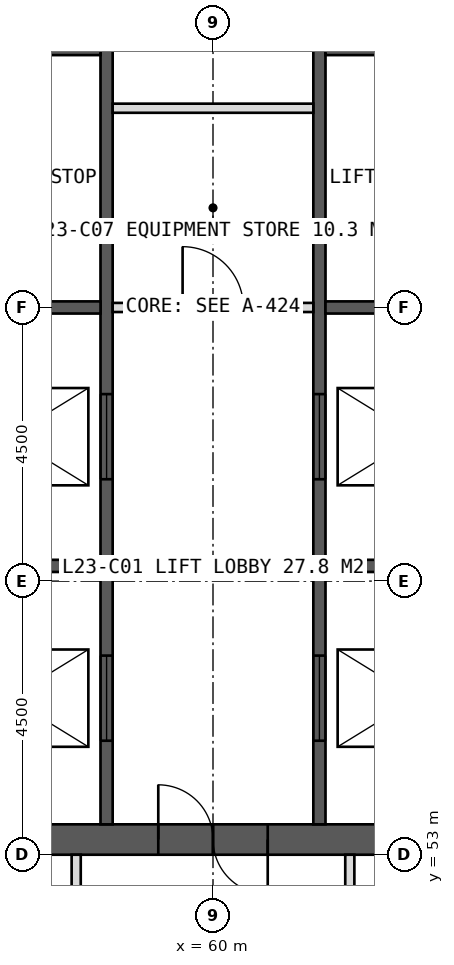
"""IFC4 building model, lengths in metres.
Left out: names, types, materials, properties, quantities, classifications, styles, units other than length and angle.
Written with IfcOpenShell. Run it as: python <this file> out.ifc"""

import sys

from ifc_helpers import new_model, si_unit, direction, frame, frame_2d, origin, place, context, subcontext, project, spatial, rectangle, extrude, element, fill, save


model = new_model("IFC4")
c1 = context("Model", 3, precision=1e-05, world=origin(), true_north=direction((0.0, 1.0)))
c2 = subcontext(c1, "Body", "Model", "MODEL_VIEW")
j1 = project(units=[si_unit("LENGTHUNIT", "METRE"), si_unit("PLANEANGLEUNIT", "RADIAN")], contexts=[c1])
p1 = place(None, origin())
s1 = spatial("IfcSite", under=j1, at=p1, CompositionType="ELEMENT")
p2 = place(p1, origin())
s2 = spatial("IfcBuilding", under=s1, at=p2, CompositionType="ELEMENT")
p3 = place(p2, frame((0.0, 0.0, 100.0)))
s3 = spatial("IfcBuildingStorey", under=s2, at=p3, CompositionType="ELEMENT", Elevation=100.0)
p4 = place(p3, frame((51.0, 53.25, 0.0), z_axis=(0.0, 0.0, 1.0), x_axis=(1.0, 0.0, 0.0)))
e1 = element("IfcWall", 1, at=p4, inside=s3, PredefinedType="SHEAR", context=c2, shape_type="SweptSolid", body=[
    extrude(rectangle(XDim=18.0, YDim=0.5, at=frame_2d((9.0, 0.0))), origin(), (0.0, 0.0, 1.0), 4.0),
])
p5 = place(p4, frame((8.1, 0.0, 0.0)))
e2 = element("IfcOpeningElement", 2, at=p5, cuts=e1, PredefinedType="OPENING", context=c2, shape_type="SweptSolid", body=[
    extrude(rectangle(XDim=1.8, YDim=2.2, at=frame_2d((0.9, 1.1))), frame((0.0, 0.26, 0.0), z_axis=(0.0, -1.0, 0.0), x_axis=(1.0, 0.0, 0.0)), (0.0, 0.0, 1.0), 0.52),
])
p6 = place(p3, frame((58.25, 53.5, 0.0), z_axis=(0.0, 0.0, 1.0), x_axis=(0.0, 1.0, 0.0)))
e3 = element("IfcWall", 3, at=p6, inside=s3, PredefinedType="SHEAR", context=c2, shape_type="SweptSolid", body=[
    extrude(rectangle(XDim=17.0, YDim=0.2, at=frame_2d((8.5, 0.0))), origin(), (0.0, 0.0, 1.0), 4.0),
])
p7 = place(p6, frame((1.375, 0.0, 0.0)))
e4 = element("IfcOpeningElement", 4, at=p7, cuts=e3, PredefinedType="OPENING", context=c2, shape_type="SweptSolid", body=[
    extrude(rectangle(XDim=1.4, YDim=2.2, at=frame_2d((0.7, 1.1))), frame((0.0, 0.11, 0.0), z_axis=(0.0, -1.0, 0.0), x_axis=(1.0, 0.0, 0.0)), (0.0, 0.0, 1.0), 0.22),
])
p8 = place(p6, frame((5.675, 0.0, 0.0)))
e5 = element("IfcOpeningElement", 5, at=p8, cuts=e3, PredefinedType="OPENING", context=c2, shape_type="SweptSolid", body=[
    extrude(rectangle(XDim=1.4, YDim=2.2, at=frame_2d((0.7, 1.1))), frame((0.0, 0.11, 0.0), z_axis=(0.0, -1.0, 0.0), x_axis=(1.0, 0.0, 0.0)), (0.0, 0.0, 1.0), 0.22),
])
p9 = place(p3, frame((61.75, 53.5, 0.0), z_axis=(0.0, 0.0, 1.0), x_axis=(0.0, 1.0, 0.0)))
e6 = element("IfcWall", 6, at=p9, inside=s3, PredefinedType="SHEAR", context=c2, shape_type="SweptSolid", body=[
    extrude(rectangle(XDim=17.0, YDim=0.2, at=frame_2d((8.5, 0.0))), origin(), (0.0, 0.0, 1.0), 4.0),
])
p10 = place(p9, frame((1.375, 0.0, 0.0)))
e7 = element("IfcOpeningElement", 7, at=p10, cuts=e6, PredefinedType="OPENING", context=c2, shape_type="SweptSolid", body=[
    extrude(rectangle(XDim=1.4, YDim=2.2, at=frame_2d((0.7, 1.1))), frame((0.0, 0.11, 0.0), z_axis=(0.0, -1.0, 0.0), x_axis=(1.0, 0.0, 0.0)), (0.0, 0.0, 1.0), 0.22),
])
p11 = place(p9, frame((5.675, 0.0, 0.0)))
e8 = element("IfcOpeningElement", 8, at=p11, cuts=e6, PredefinedType="OPENING", context=c2, shape_type="SweptSolid", body=[
    extrude(rectangle(XDim=1.4, YDim=2.2, at=frame_2d((0.7, 1.1))), frame((0.0, 0.11, 0.0), z_axis=(0.0, -1.0, 0.0), x_axis=(1.0, 0.0, 0.0)), (0.0, 0.0, 1.0), 0.22),
])
for number, where, z_axis, x_axis in (
    (9, (55.1, 57.75, 0.0), (0.0, 0.0, 1.0), (1.0, 0.0, 0.0)),
    (10, (61.85, 57.75, 0.0), (0.0, 0.0, 1.0), (1.0, 0.0, 0.0)),
    (11, (55.1, 62.0, 0.0), (0.0, 0.0, 1.0), (1.0, 0.0, 0.0)),
    (12, (61.85, 62.0, 0.0), (0.0, 0.0, 1.0), (1.0, 0.0, 0.0)),
    (13, (55.1, 66.25, 0.0), (0.0, 0.0, 1.0), (1.0, 0.0, 0.0)),
    (14, (61.85, 66.25, 0.0), (0.0, 0.0, 1.0), (1.0, 0.0, 0.0)),
):
    element("IfcWall", number, at=place(p3, frame(where, z_axis=z_axis, x_axis=x_axis)), inside=s3, PredefinedType="SHEAR", context=c2, shape_type="SweptSolid", body=[
        extrude(rectangle(XDim=3.05, YDim=0.2, at=frame_2d((1.525, 0.0))), origin(), (0.0, 0.0, 1.0), 4.0),
    ])
p12 = place(p3, frame((62.25, 53.0, 0.0), z_axis=(0.0, 0.0, 1.0), x_axis=(0.0, -1.0, 0.0)))
e15 = element("IfcWall", 15, at=p12, inside=s3, PredefinedType="PARTITIONING", context=c2, shape_type="SweptSolid", body=[
    extrude(rectangle(XDim=6.6, YDim=0.15, at=frame_2d((3.3, 0.0))), origin(), (0.0, 0.0, 1.0), 3.75),
])
p13 = place(p12, frame((0.6, 0.0, 0.0)))
e16 = element("IfcOpeningElement", 16, at=p13, cuts=e15, PredefinedType="OPENING", context=c2, shape_type="SweptSolid", body=[
    extrude(rectangle(XDim=0.9, YDim=2.1, at=frame_2d((0.45, 1.05))), frame((0.0, 0.085, 0.0), z_axis=(0.0, -1.0, 0.0), x_axis=(1.0, 0.0, 0.0)), (0.0, 0.0, 1.0), 0.17),
])
p14 = place(p3, frame((57.75, 53.0, 0.0), z_axis=(0.0, 0.0, 1.0), x_axis=(0.0, -1.0, 0.0)))
e17 = element("IfcWall", 17, at=p14, inside=s3, PredefinedType="PARTITIONING", context=c2, shape_type="SweptSolid", body=[
    extrude(rectangle(XDim=6.6, YDim=0.15, at=frame_2d((3.3, 0.0))), origin(), (0.0, 0.0, 1.0), 3.75),
])
p15 = place(p3, frame((58.35, 62.0, 0.0), z_axis=(0.0, 0.0, 1.0), x_axis=(1.0, 0.0, 0.0)))
e18 = element("IfcWall", 18, at=p15, inside=s3, PredefinedType="PARTITIONING", context=c2, shape_type="SweptSolid", body=[
    extrude(rectangle(XDim=3.3, YDim=0.15, at=frame_2d((1.65, 0.0))), origin(), (0.0, 0.0, 1.0), 3.75),
])
p16 = place(p15, frame((1.15, 0.0, 0.0)))
e19 = element("IfcOpeningElement", 19, at=p16, cuts=e18, PredefinedType="OPENING", context=c2, shape_type="SweptSolid", body=[
    extrude(rectangle(XDim=1.0, YDim=2.1, at=frame_2d((0.5, 1.05))), frame((0.0, 0.085, 0.0), z_axis=(0.0, -1.0, 0.0), x_axis=(1.0, 0.0, 0.0)), (0.0, 0.0, 1.0), 0.17),
])
p17 = place(p3, frame((58.35, 65.277, 0.0), z_axis=(0.0, 0.0, 1.0), x_axis=(1.0, 0.0, 0.0)))
e20 = element("IfcWall", 20, at=p17, inside=s3, PredefinedType="PARTITIONING", context=c2, shape_type="SweptSolid", body=[
    extrude(rectangle(XDim=3.3, YDim=0.15, at=frame_2d((1.65, 0.0))), origin(), (0.0, 0.0, 1.0), 3.75),
])
p18 = place(p5, origin())
e21 = element("IfcDoor", 21, at=p18, inside=s3, OperationType="DOUBLE_DOOR_SINGLE_SWING", PredefinedType="DOOR", context=c2, shape_type="SweptSolid", body=[
    extrude(rectangle(XDim=1.8, YDim=2.2, at=frame_2d((0.9, 1.1))), frame((0.0, 0.025, 0.0), z_axis=(0.0, -1.0, 0.0), x_axis=(1.0, 0.0, 0.0)), (0.0, 0.0, 1.0), 0.05),
])
fill(e2, e21)
p19 = place(p7, origin())
e22 = element("IfcDoor", 22, at=p19, inside=s3, OperationType="SLIDING_TO_LEFT", PredefinedType="DOOR", context=c2, shape_type="SweptSolid", body=[
    extrude(rectangle(XDim=1.4, YDim=2.2, at=frame_2d((0.7, 1.1))), frame((0.0, 0.025, 0.0), z_axis=(0.0, -1.0, 0.0), x_axis=(1.0, 0.0, 0.0)), (0.0, 0.0, 1.0), 0.05),
])
fill(e4, e22)
p20 = place(p10, origin())
e23 = element("IfcDoor", 23, at=p20, inside=s3, OperationType="SLIDING_TO_LEFT", PredefinedType="DOOR", context=c2, shape_type="SweptSolid", body=[
    extrude(rectangle(XDim=1.4, YDim=2.2, at=frame_2d((0.7, 1.1))), frame((0.0, 0.025, 0.0), z_axis=(0.0, -1.0, 0.0), x_axis=(1.0, 0.0, 0.0)), (0.0, 0.0, 1.0), 0.05),
])
fill(e7, e23)
p21 = place(p8, origin())
e24 = element("IfcDoor", 24, at=p21, inside=s3, OperationType="SLIDING_TO_LEFT", PredefinedType="DOOR", context=c2, shape_type="SweptSolid", body=[
    extrude(rectangle(XDim=1.4, YDim=2.2, at=frame_2d((0.7, 1.1))), frame((0.0, 0.025, 0.0), z_axis=(0.0, -1.0, 0.0), x_axis=(1.0, 0.0, 0.0)), (0.0, 0.0, 1.0), 0.05),
])
fill(e5, e24)
p22 = place(p11, origin())
e25 = element("IfcDoor", 25, at=p22, inside=s3, OperationType="SLIDING_TO_LEFT", PredefinedType="DOOR", context=c2, shape_type="SweptSolid", body=[
    extrude(rectangle(XDim=1.4, YDim=2.2, at=frame_2d((0.7, 1.1))), frame((0.0, 0.025, 0.0), z_axis=(0.0, -1.0, 0.0), x_axis=(1.0, 0.0, 0.0)), (0.0, 0.0, 1.0), 0.05),
])
fill(e8, e25)
p23 = place(p16, origin())
e26 = element("IfcDoor", 26, at=p23, inside=s3, OperationType="SINGLE_SWING_LEFT", PredefinedType="DOOR", context=c2, shape_type="SweptSolid", body=[
    extrude(rectangle(XDim=1.0, YDim=2.1, at=frame_2d((0.5, 1.05))), frame((0.0, 0.025, 0.0), z_axis=(0.0, -1.0, 0.0), x_axis=(1.0, 0.0, 0.0)), (0.0, 0.0, 1.0), 0.05),
])
fill(e19, e26)
save(model, sys.argv[1])
